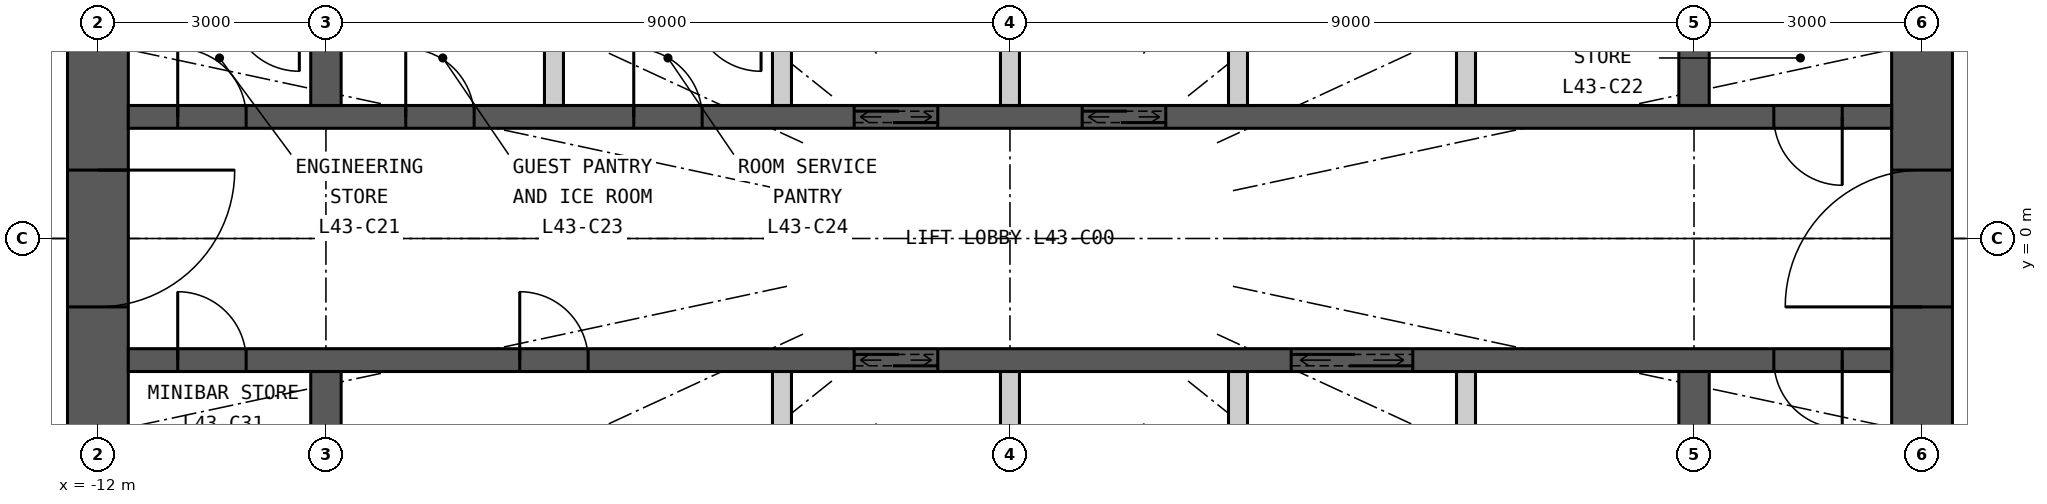
"""IFC4 building model, lengths in metres.
Left out: names, types, materials, properties, quantities, classifications, styles, units other than length and angle.
Written with IfcOpenShell. Run it as: python <this file> out.ifc"""

import sys

from ifc_helpers import new_model, si_unit, direction, frame, frame_2d, origin, place, context, subcontext, project, spatial, rectangle, extrude, element, fill, save


model = new_model("IFC4")
c1 = context("Model", 3, precision=1e-05, world=origin(), true_north=direction((0.0, 1.0)))
c2 = subcontext(c1, "Body", "Model", "MODEL_VIEW")
j1 = project(units=[si_unit("LENGTHUNIT", "METRE"), si_unit("PLANEANGLEUNIT", "RADIAN")], contexts=[c1])
p1 = place(None, origin())
s1 = spatial("IfcSite", under=j1, at=p1, CompositionType="ELEMENT")
p2 = place(p1, origin())
s2 = spatial("IfcBuilding", under=s1, at=p2, CompositionType="ELEMENT")
p3 = place(p2, frame((0.0, 0.0, 163.2)))
s3 = spatial("IfcBuildingStorey", under=s2, at=p3, CompositionType="ELEMENT", Elevation=163.2)
p4 = place(p3, frame((12.0, -7.6, 0.0), z_axis=(0.0, 0.0, 1.0), x_axis=(0.0, 1.0, 0.0)))
e1 = element("IfcWall", 1, at=p4, inside=s3, PredefinedType="SHEAR", context=c2, shape_type="SweptSolid", body=[
    extrude(rectangle(XDim=15.2, YDim=0.8, at=frame_2d((7.6, 0.0))), origin(), (0.0, 0.0, 1.0), 3.3),
])
p5 = place(p4, frame((6.7, 0.0, 0.0)))
e2 = element("IfcOpeningElement", 2, at=p5, cuts=e1, PredefinedType="OPENING", context=c2, shape_type="SweptSolid", body=[
    extrude(rectangle(XDim=1.8, YDim=2.2, at=frame_2d((0.9, 1.1))), frame((0.0, 0.41, 0.0), z_axis=(0.0, -1.0, 0.0), x_axis=(1.0, 0.0, 0.0)), (0.0, 0.0, 1.0), 0.82),
])
p6 = place(p3, frame((-12.0, 7.6, 0.0), z_axis=(0.0, 0.0, 1.0), x_axis=(0.0, -1.0, 0.0)))
e3 = element("IfcWall", 3, at=p6, inside=s3, PredefinedType="SHEAR", context=c2, shape_type="SweptSolid", body=[
    extrude(rectangle(XDim=15.2, YDim=0.8, at=frame_2d((7.6, 0.0))), origin(), (0.0, 0.0, 1.0), 3.3),
])
p7 = place(p6, frame((6.7, 0.0, 0.0)))
e4 = element("IfcOpeningElement", 4, at=p7, cuts=e3, PredefinedType="OPENING", context=c2, shape_type="SweptSolid", body=[
    extrude(rectangle(XDim=1.8, YDim=2.2, at=frame_2d((0.9, 1.1))), frame((0.0, 0.41, 0.0), z_axis=(0.0, -1.0, 0.0), x_axis=(1.0, 0.0, 0.0)), (0.0, 0.0, 1.0), 0.82),
])
p8 = place(p3, frame((-11.6, 1.6, 0.0), z_axis=(0.0, 0.0, 1.0), x_axis=(1.0, 0.0, 0.0)))
e5 = element("IfcWall", 5, at=p8, inside=s3, PredefinedType="SHEAR", context=c2, shape_type="SweptSolid", body=[
    extrude(rectangle(XDim=23.2, YDim=0.3, at=frame_2d((11.6, 0.0))), origin(), (0.0, 0.0, 1.0), 3.3),
])
p9 = place(p8, frame((9.55, 0.0, 0.0)))
e6 = element("IfcOpeningElement", 6, at=p9, cuts=e5, PredefinedType="OPENING", context=c2, shape_type="SweptSolid", body=[
    extrude(rectangle(XDim=1.1, YDim=2.2, at=frame_2d((0.55, 1.1))), frame((0.0, 0.16, 0.0), z_axis=(0.0, -1.0, 0.0), x_axis=(1.0, 0.0, 0.0)), (0.0, 0.0, 1.0), 0.32),
])
p10 = place(p8, frame((12.55, 0.0, 0.0)))
e7 = element("IfcOpeningElement", 7, at=p10, cuts=e5, PredefinedType="OPENING", context=c2, shape_type="SweptSolid", body=[
    extrude(rectangle(XDim=1.1, YDim=2.2, at=frame_2d((0.55, 1.1))), frame((0.0, 0.16, 0.0), z_axis=(0.0, -1.0, 0.0), x_axis=(1.0, 0.0, 0.0)), (0.0, 0.0, 1.0), 0.32),
])
p11 = place(p8, frame((0.65, 0.0, 0.0)))
e8 = element("IfcOpeningElement", 8, at=p11, cuts=e5, PredefinedType="OPENING", context=c2, shape_type="SweptSolid", body=[
    extrude(rectangle(XDim=0.9, YDim=2.2, at=frame_2d((0.45, 1.1))), frame((0.0, 0.16, 0.0), z_axis=(0.0, -1.0, 0.0), x_axis=(1.0, 0.0, 0.0)), (0.0, 0.0, 1.0), 0.32),
])
p12 = place(p8, frame((21.65, 0.0, 0.0)))
e9 = element("IfcOpeningElement", 9, at=p12, cuts=e5, PredefinedType="OPENING", context=c2, shape_type="SweptSolid", body=[
    extrude(rectangle(XDim=0.9, YDim=2.2, at=frame_2d((0.45, 1.1))), frame((0.0, 0.16, 0.0), z_axis=(0.0, -1.0, 0.0), x_axis=(1.0, 0.0, 0.0)), (0.0, 0.0, 1.0), 0.32),
])
p13 = place(p8, frame((3.65, 0.0, 0.0)))
e10 = element("IfcOpeningElement", 10, at=p13, cuts=e5, PredefinedType="OPENING", context=c2, shape_type="SweptSolid", body=[
    extrude(rectangle(XDim=0.9, YDim=2.2, at=frame_2d((0.45, 1.1))), frame((0.0, 0.16, 0.0), z_axis=(0.0, -1.0, 0.0), x_axis=(1.0, 0.0, 0.0)), (0.0, 0.0, 1.0), 0.32),
])
p14 = place(p8, frame((6.65, 0.0, 0.0)))
e11 = element("IfcOpeningElement", 11, at=p14, cuts=e5, PredefinedType="OPENING", context=c2, shape_type="SweptSolid", body=[
    extrude(rectangle(XDim=0.9, YDim=2.2, at=frame_2d((0.45, 1.1))), frame((0.0, 0.16, 0.0), z_axis=(0.0, -1.0, 0.0), x_axis=(1.0, 0.0, 0.0)), (0.0, 0.0, 1.0), 0.32),
])
p15 = place(p3, frame((-11.6, -1.6, 0.0), z_axis=(0.0, 0.0, 1.0), x_axis=(1.0, 0.0, 0.0)))
e12 = element("IfcWall", 12, at=p15, inside=s3, PredefinedType="SHEAR", context=c2, shape_type="SweptSolid", body=[
    extrude(rectangle(XDim=23.2, YDim=0.3, at=frame_2d((11.6, 0.0))), origin(), (0.0, 0.0, 1.0), 3.3),
])
p16 = place(p15, frame((9.55, 0.0, 0.0)))
e13 = element("IfcOpeningElement", 13, at=p16, cuts=e12, PredefinedType="OPENING", context=c2, shape_type="SweptSolid", body=[
    extrude(rectangle(XDim=1.1, YDim=2.2, at=frame_2d((0.55, 1.1))), frame((0.0, 0.16, 0.0), z_axis=(0.0, -1.0, 0.0), x_axis=(1.0, 0.0, 0.0)), (0.0, 0.0, 1.0), 0.32),
])
p17 = place(p15, frame((15.3, 0.0, 0.0)))
e14 = element("IfcOpeningElement", 14, at=p17, cuts=e12, PredefinedType="OPENING", context=c2, shape_type="SweptSolid", body=[
    extrude(rectangle(XDim=1.6, YDim=2.4, at=frame_2d((0.8, 1.2))), frame((0.0, 0.16, 0.0), z_axis=(0.0, -1.0, 0.0), x_axis=(1.0, 0.0, 0.0)), (0.0, 0.0, 1.0), 0.32),
])
p18 = place(p15, frame((0.65, 0.0, 0.0)))
e15 = element("IfcOpeningElement", 15, at=p18, cuts=e12, PredefinedType="OPENING", context=c2, shape_type="SweptSolid", body=[
    extrude(rectangle(XDim=0.9, YDim=2.2, at=frame_2d((0.45, 1.1))), frame((0.0, 0.16, 0.0), z_axis=(0.0, -1.0, 0.0), x_axis=(1.0, 0.0, 0.0)), (0.0, 0.0, 1.0), 0.32),
])
p19 = place(p15, frame((5.15, 0.0, 0.0)))
e16 = element("IfcOpeningElement", 16, at=p19, cuts=e12, PredefinedType="OPENING", context=c2, shape_type="SweptSolid", body=[
    extrude(rectangle(XDim=0.9, YDim=2.2, at=frame_2d((0.45, 1.1))), frame((0.0, 0.16, 0.0), z_axis=(0.0, -1.0, 0.0), x_axis=(1.0, 0.0, 0.0)), (0.0, 0.0, 1.0), 0.32),
])
p20 = place(p15, frame((21.65, 0.0, 0.0)))
e17 = element("IfcOpeningElement", 17, at=p20, cuts=e12, PredefinedType="OPENING", context=c2, shape_type="SweptSolid", body=[
    extrude(rectangle(XDim=0.9, YDim=2.2, at=frame_2d((0.45, 1.1))), frame((0.0, 0.16, 0.0), z_axis=(0.0, -1.0, 0.0), x_axis=(1.0, 0.0, 0.0)), (0.0, 0.0, 1.0), 0.32),
])
for number, where, z_axis, x_axis in (
    (18, (-9.0, 1.75, 0.0), (0.0, 0.0, 1.0), (0.0, 1.0, 0.0)),
    (19, (-9.0, -4.1, 0.0), (0.0, 0.0, 1.0), (0.0, 1.0, 0.0)),
    (20, (9.0, 1.75, 0.0), (0.0, 0.0, 1.0), (0.0, 1.0, 0.0)),
    (21, (9.0, -4.1, 0.0), (0.0, 0.0, 1.0), (0.0, 1.0, 0.0)),
):
    element("IfcWall", number, at=place(p3, frame(where, z_axis=z_axis, x_axis=x_axis)), inside=s3, PredefinedType="SHEAR", context=c2, shape_type="SweptSolid", body=[
        extrude(rectangle(XDim=2.35, YDim=0.4, at=frame_2d((1.175, 0.0))), origin(), (0.0, 0.0, 1.0), 3.3),
    ])
for number, where, z_axis, x_axis in (
    (22, (-6.0, 1.75, 0.0), (0.0, 0.0, 1.0), (0.0, 1.0, 0.0)),
    (23, (-3.0, 1.75, 0.0), (0.0, 0.0, 1.0), (0.0, 1.0, 0.0)),
    (24, (0.0, 1.75, 0.0), (0.0, 0.0, 1.0), (0.0, 1.0, 0.0)),
    (25, (3.0, 1.75, 0.0), (0.0, 0.0, 1.0), (0.0, 1.0, 0.0)),
    (26, (6.0, 1.75, 0.0), (0.0, 0.0, 1.0), (0.0, 1.0, 0.0)),
    (27, (-3.0, -4.1, 0.0), (0.0, 0.0, 1.0), (0.0, 1.0, 0.0)),
    (28, (0.0, -4.1, 0.0), (0.0, 0.0, 1.0), (0.0, 1.0, 0.0)),
    (29, (3.0, -4.1, 0.0), (0.0, 0.0, 1.0), (0.0, 1.0, 0.0)),
    (30, (6.0, -4.1, 0.0), (0.0, 0.0, 1.0), (0.0, 1.0, 0.0)),
):
    element("IfcWall", number, at=place(p3, frame(where, z_axis=z_axis, x_axis=x_axis)), inside=s3, PredefinedType="PARTITIONING", context=c2, shape_type="SweptSolid", body=[
        extrude(rectangle(XDim=2.35, YDim=0.25, at=frame_2d((1.175, 0.0))), origin(), (0.0, 0.0, 1.0), 3.3),
    ])
p21 = place(p9, origin())
e31 = element("IfcDoor", 31, at=p21, inside=s3, OperationType="DOUBLE_DOOR_SLIDING", PredefinedType="DOOR", context=c2, shape_type="SweptSolid", body=[
    extrude(rectangle(XDim=1.1, YDim=2.2, at=frame_2d((0.55, 1.1))), frame((0.0, 0.025, 0.0), z_axis=(0.0, -1.0, 0.0), x_axis=(1.0, 0.0, 0.0)), (0.0, 0.0, 1.0), 0.05),
])
fill(e6, e31)
p22 = place(p10, origin())
e32 = element("IfcDoor", 32, at=p22, inside=s3, OperationType="DOUBLE_DOOR_SLIDING", PredefinedType="DOOR", context=c2, shape_type="SweptSolid", body=[
    extrude(rectangle(XDim=1.1, YDim=2.2, at=frame_2d((0.55, 1.1))), frame((0.0, 0.025, 0.0), z_axis=(0.0, -1.0, 0.0), x_axis=(1.0, 0.0, 0.0)), (0.0, 0.0, 1.0), 0.05),
])
fill(e7, e32)
p23 = place(p16, origin())
e33 = element("IfcDoor", 33, at=p23, inside=s3, OperationType="DOUBLE_DOOR_SLIDING", PredefinedType="DOOR", context=c2, shape_type="SweptSolid", body=[
    extrude(rectangle(XDim=1.1, YDim=2.2, at=frame_2d((0.55, 1.1))), frame((0.0, 0.025, 0.0), z_axis=(0.0, -1.0, 0.0), x_axis=(1.0, 0.0, 0.0)), (0.0, 0.0, 1.0), 0.05),
])
fill(e13, e33)
p24 = place(p17, origin())
e34 = element("IfcDoor", 34, at=p24, inside=s3, OperationType="DOUBLE_DOOR_SLIDING", PredefinedType="DOOR", context=c2, shape_type="SweptSolid", body=[
    extrude(rectangle(XDim=1.6, YDim=2.4, at=frame_2d((0.8, 1.2))), frame((0.0, 0.025, 0.0), z_axis=(0.0, -1.0, 0.0), x_axis=(1.0, 0.0, 0.0)), (0.0, 0.0, 1.0), 0.05),
])
fill(e14, e34)
p25 = place(p11, origin())
e35 = element("IfcDoor", 35, at=p25, inside=s3, OperationType="SINGLE_SWING_LEFT", PredefinedType="DOOR", context=c2, shape_type="SweptSolid", body=[
    extrude(rectangle(XDim=0.9, YDim=2.2, at=frame_2d((0.45, 1.1))), frame((0.0, 0.025, 0.0), z_axis=(0.0, -1.0, 0.0), x_axis=(1.0, 0.0, 0.0)), (0.0, 0.0, 1.0), 0.05),
])
fill(e8, e35)
p26 = place(p12, origin())
e36 = element("IfcDoor", 36, at=p26, inside=s3, OperationType="SINGLE_SWING_RIGHT", PredefinedType="DOOR", context=c2, shape_type="SweptSolid", body=[
    extrude(rectangle(XDim=0.9, YDim=2.2, at=frame_2d((0.45, 1.1))), frame((0.0, 0.025, 0.0), z_axis=(0.0, -1.0, 0.0), x_axis=(1.0, 0.0, 0.0)), (0.0, 0.0, 1.0), 0.05),
])
fill(e9, e36)
p27 = place(p18, origin())
e37 = element("IfcDoor", 37, at=p27, inside=s3, OperationType="SINGLE_SWING_LEFT", PredefinedType="DOOR", context=c2, shape_type="SweptSolid", body=[
    extrude(rectangle(XDim=0.9, YDim=2.2, at=frame_2d((0.45, 1.1))), frame((0.0, 0.025, 0.0), z_axis=(0.0, -1.0, 0.0), x_axis=(1.0, 0.0, 0.0)), (0.0, 0.0, 1.0), 0.05),
])
fill(e15, e37)
p28 = place(p19, origin())
e38 = element("IfcDoor", 38, at=p28, inside=s3, OperationType="SINGLE_SWING_LEFT", PredefinedType="DOOR", context=c2, shape_type="SweptSolid", body=[
    extrude(rectangle(XDim=0.9, YDim=2.2, at=frame_2d((0.45, 1.1))), frame((0.0, 0.025, 0.0), z_axis=(0.0, -1.0, 0.0), x_axis=(1.0, 0.0, 0.0)), (0.0, 0.0, 1.0), 0.05),
])
fill(e16, e38)
p29 = place(p20, origin())
e39 = element("IfcDoor", 39, at=p29, inside=s3, OperationType="SINGLE_SWING_RIGHT", PredefinedType="DOOR", context=c2, shape_type="SweptSolid", body=[
    extrude(rectangle(XDim=0.9, YDim=2.2, at=frame_2d((0.45, 1.1))), frame((0.0, 0.025, 0.0), z_axis=(0.0, -1.0, 0.0), x_axis=(1.0, 0.0, 0.0)), (0.0, 0.0, 1.0), 0.05),
])
fill(e17, e39)
p30 = place(p13, origin())
e40 = element("IfcDoor", 40, at=p30, inside=s3, OperationType="SINGLE_SWING_LEFT", PredefinedType="DOOR", context=c2, shape_type="SweptSolid", body=[
    extrude(rectangle(XDim=0.9, YDim=2.2, at=frame_2d((0.45, 1.1))), frame((0.0, 0.025, 0.0), z_axis=(0.0, -1.0, 0.0), x_axis=(1.0, 0.0, 0.0)), (0.0, 0.0, 1.0), 0.05),
])
fill(e10, e40)
p31 = place(p14, origin())
e41 = element("IfcDoor", 41, at=p31, inside=s3, OperationType="SINGLE_SWING_LEFT", PredefinedType="DOOR", context=c2, shape_type="SweptSolid", body=[
    extrude(rectangle(XDim=0.9, YDim=2.2, at=frame_2d((0.45, 1.1))), frame((0.0, 0.025, 0.0), z_axis=(0.0, -1.0, 0.0), x_axis=(1.0, 0.0, 0.0)), (0.0, 0.0, 1.0), 0.05),
])
fill(e11, e41)
p32 = place(p5, origin())
e42 = element("IfcDoor", 42, at=p32, inside=s3, OperationType="DOUBLE_DOOR_DOUBLE_SWING", PredefinedType="DOOR", context=c2, shape_type="SweptSolid", body=[
    extrude(rectangle(XDim=1.8, YDim=2.2, at=frame_2d((0.9, 1.1))), frame((0.0, 0.025, 0.0), z_axis=(0.0, -1.0, 0.0), x_axis=(1.0, 0.0, 0.0)), (0.0, 0.0, 1.0), 0.05),
])
fill(e2, e42)
p33 = place(p7, origin())
e43 = element("IfcDoor", 43, at=p33, inside=s3, OperationType="DOUBLE_DOOR_DOUBLE_SWING", PredefinedType="DOOR", context=c2, shape_type="SweptSolid", body=[
    extrude(rectangle(XDim=1.8, YDim=2.2, at=frame_2d((0.9, 1.1))), frame((0.0, 0.025, 0.0), z_axis=(0.0, -1.0, 0.0), x_axis=(1.0, 0.0, 0.0)), (0.0, 0.0, 1.0), 0.05),
])
fill(e4, e43)
save(model, sys.argv[1])
